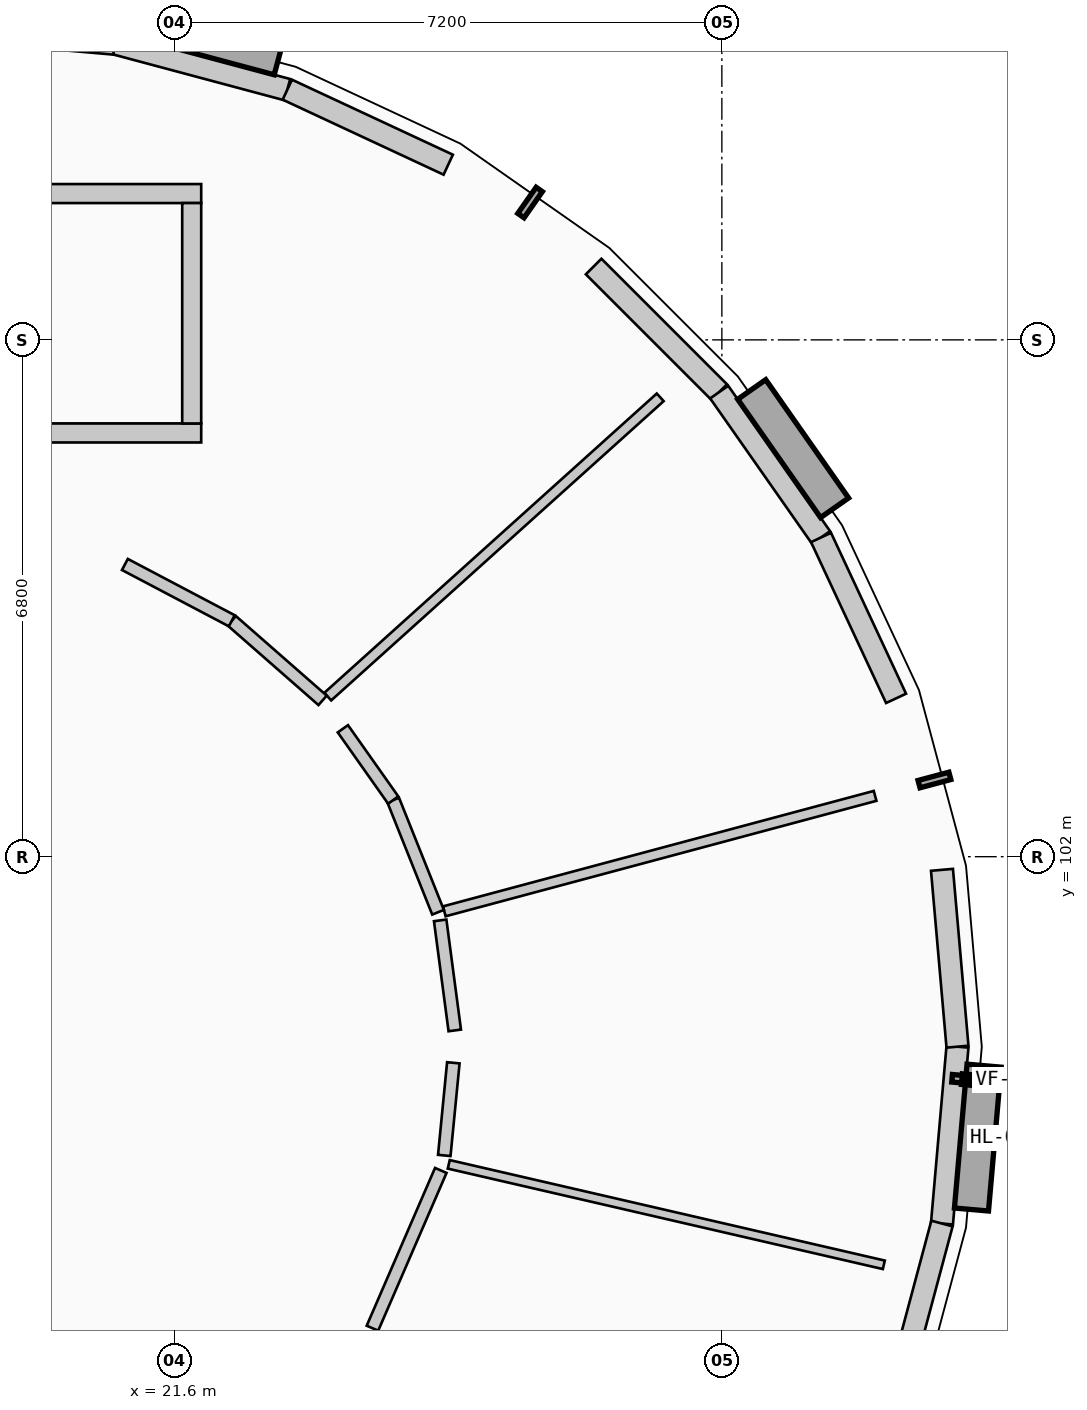
"""IFC4 building model, lengths in metres.
Left out: names, types, materials, properties, quantities, classifications, styles, units other than length and angle.
Written with IfcOpenShell. Run it as: python <this file> out.ifc"""

import sys

from ifc_helpers import new_model, si_unit, direction, frame, frame_2d, origin, origin_2d, place, context, subcontext, project, spatial, rectangle, extrude, element, fill, save


model = new_model("IFC4")
c1 = context("Model", 3, precision=1e-05, world=origin(), true_north=direction((0.0, 1.0)))
c2 = subcontext(c1, "Body", "Model", "MODEL_VIEW")
j1 = project(units=[si_unit("LENGTHUNIT", "METRE"), si_unit("PLANEANGLEUNIT", "RADIAN")], contexts=[c1])
p1 = place(None, origin())
s1 = spatial("IfcSite", under=j1, at=p1, CompositionType="ELEMENT")
p2 = place(p1, origin())
s2 = spatial("IfcBuilding", under=s1, at=p2, CompositionType="ELEMENT")
p3 = place(p2, frame((0.0, 0.0, 4.55)))
s3 = spatial("IfcBuildingStorey", under=s2, at=p3, CompositionType="ELEMENT", Elevation=4.55)
for number, where, z_axis, x_axis in (
    (1, (31.38, 99.5, 0.0), (0.0, 0.0, 1.0), (1.0, 0.0, 0.0)),
    (2, (30.603, 103.905, 0.0), (0.0, 0.0, 1.0), (1.0, 0.0, 0.0)),
    (3, (28.367, 107.779, 0.0), (0.0, 0.0, 1.0), (1.0, 0.0, 0.0)),
    (4, (24.94, 110.654, 0.0), (0.0, 0.0, 1.0), (1.0, 0.0, 0.0)),
    (5, (20.737, 112.184, 0.0), (0.0, 0.0, 1.0), (1.0, 0.0, 0.0)),
    (6, (25.3, 99.5, 0.0), (0.0, 0.0, 1.0), (1.0, 0.0, 0.0)),
    (7, (23.709, 103.871, 0.0), (0.0, 0.0, 1.0), (1.0, 0.0, 0.0)),
):
    element("IfcColumn", number, at=place(p3, frame(where, z_axis=z_axis, x_axis=x_axis)), inside=s3, PredefinedType="COLUMN", context=c2, shape_type="SweptSolid", body=[
        extrude(rectangle(XDim=0.42, YDim=0.42, at=origin_2d()), origin(), (0.0, 0.0, 1.0), 4.2),
    ])
p4 = place(p3, frame((31.9, 99.5, 0.0), z_axis=(0.0, 0.0, 1.0), x_axis=(-0.087274565792, -0.996184295282, 0.0)))
e8 = element("IfcWall", 8, at=p4, inside=s3, PredefinedType="ELEMENTEDWALL", context=c2, shape_type="SweptSolid", body=[
    extrude(rectangle(XDim=2.336, YDim=0.29, at=frame_2d((1.168, 0.0))), origin(), (0.0, 0.0, 1.0), 3.309),
])
p5 = place(p4, frame((0.568, 0.0, 0.85)))
e9 = element("IfcOpeningElement", 9, at=p5, cuts=e8, PredefinedType="OPENING", context=c2, shape_type="SweptSolid", body=[
    extrude(rectangle(XDim=1.2, YDim=1.35, at=frame_2d((0.6, 0.675))), frame((0.0, 0.155, 0.0), z_axis=(0.0, -1.0, 0.0), x_axis=(1.0, 0.0, 0.0)), (0.0, 0.0, 1.0), 0.31),
])
p6 = place(p3, frame((31.696, 97.173, 0.0), z_axis=(0.0, 0.0, 1.0), x_axis=(-0.258612423585, -0.965981166673, 0.0)))
e10 = element("IfcWall", 10, at=p6, inside=s3, PredefinedType="ELEMENTEDWALL", context=c2, shape_type="SweptSolid", body=[
    extrude(rectangle(XDim=2.335, YDim=0.29, at=frame_2d((1.168, 0.0))), origin(), (0.0, 0.0, 1.0), 3.309),
])
p7 = place(p6, frame((0.568, 0.0, 0.85)))
e11 = element("IfcOpeningElement", 11, at=p7, cuts=e10, PredefinedType="OPENING", context=c2, shape_type="SweptSolid", body=[
    extrude(rectangle(XDim=1.2, YDim=1.65, at=frame_2d((0.6, 0.825))), frame((0.0, 0.155, 0.0), z_axis=(0.0, -1.0, 0.0), x_axis=(1.0, 0.0, 0.0)), (0.0, 0.0, 1.0), 0.31),
])
p8 = place(p3, frame((18.5, 112.9, 0.0), z_axis=(0.0, 0.0, 1.0), x_axis=(0.996184295282, -0.087274565792, 0.0)))
e12 = element("IfcWall", 12, at=p8, inside=s3, PredefinedType="ELEMENTEDWALL", context=c2, shape_type="SweptSolid", body=[
    extrude(rectangle(XDim=2.336, YDim=0.29, at=frame_2d((1.168, 0.0))), origin(), (0.0, 0.0, 1.0), 3.309),
])
p9 = place(p3, frame((20.827, 112.696, 0.0), z_axis=(0.0, 0.0, 1.0), x_axis=(0.965981166673, -0.258612423585, 0.0)))
e13 = element("IfcWall", 13, at=p9, inside=s3, PredefinedType="ELEMENTEDWALL", context=c2, shape_type="SweptSolid", body=[
    extrude(rectangle(XDim=2.335, YDim=0.29, at=frame_2d((1.168, 0.0))), origin(), (0.0, 0.0, 1.0), 3.309),
])
p10 = place(p9, frame((0.478, 0.0, 0.85)))
e14 = element("IfcOpeningElement", 14, at=p10, cuts=e13, PredefinedType="OPENING", context=c2, shape_type="SweptSolid", body=[
    extrude(rectangle(XDim=1.38, YDim=1.7, at=frame_2d((0.69, 0.85))), frame((0.0, 0.155, 0.0), z_axis=(0.0, -1.0, 0.0), x_axis=(1.0, 0.0, 0.0)), (0.0, 0.0, 1.0), 0.31),
])
p11 = place(p3, frame((23.083, 112.092, 0.0), z_axis=(0.0, 0.0, 1.0), x_axis=(0.906321946979, -0.422587894318, 0.0)))
e15 = element("IfcWall", 15, at=p11, inside=s3, PredefinedType="ELEMENTEDWALL", context=c2, shape_type="SweptSolid", body=[
    extrude(rectangle(XDim=2.336, YDim=0.29, at=frame_2d((1.168, 0.0))), origin(), (0.0, 0.0, 1.0), 3.309),
])
p12 = place(p11, frame((0.468, 0.0, 0.85)))
e16 = element("IfcOpeningElement", 16, at=p12, cuts=e15, PredefinedType="OPENING", context=c2, shape_type="SweptSolid", body=[
    extrude(rectangle(XDim=1.4, YDim=1.25, at=frame_2d((0.7, 0.625))), frame((0.0, 0.155, 0.0), z_axis=(0.0, -1.0, 0.0), x_axis=(1.0, 0.0, 0.0)), (0.0, 0.0, 1.0), 0.31),
])
p13 = place(p3, frame((27.113, 109.765, 0.0), z_axis=(0.0, 0.0, 1.0), x_axis=(0.707106781187, -0.707106781187, 0.0)))
e17 = element("IfcWall", 17, at=p13, inside=s3, PredefinedType="ELEMENTEDWALL", context=c2, shape_type="SweptSolid", body=[
    extrude(rectangle(XDim=2.336, YDim=0.29, at=frame_2d((1.168, 0.0))), origin(), (0.0, 0.0, 1.0), 3.309),
])
p14 = place(p13, frame((0.468, 0.0, 0.85)))
e18 = element("IfcOpeningElement", 18, at=p14, cuts=e17, PredefinedType="OPENING", context=c2, shape_type="SweptSolid", body=[
    extrude(rectangle(XDim=1.4, YDim=1.6, at=frame_2d((0.7, 0.8))), frame((0.0, 0.155, 0.0), z_axis=(0.0, -1.0, 0.0), x_axis=(1.0, 0.0, 0.0)), (0.0, 0.0, 1.0), 0.31),
])
p15 = place(p3, frame((28.765, 108.113, 0.0), z_axis=(0.0, 0.0, 1.0), x_axis=(0.573728883722, -0.819045278347, 0.0)))
e19 = element("IfcWall", 19, at=p15, inside=s3, PredefinedType="ELEMENTEDWALL", context=c2, shape_type="SweptSolid", body=[
    extrude(rectangle(XDim=2.336, YDim=0.29, at=frame_2d((1.168, 0.0))), origin(), (0.0, 0.0, 1.0), 3.309),
])
p16 = place(p15, frame((0.468, 0.0, 0.85)))
e20 = element("IfcOpeningElement", 20, at=p16, cuts=e19, PredefinedType="OPENING", context=c2, shape_type="SweptSolid", body=[
    extrude(rectangle(XDim=1.4, YDim=1.9, at=frame_2d((0.7, 0.95))), frame((0.0, 0.155, 0.0), z_axis=(0.0, -1.0, 0.0), x_axis=(1.0, 0.0, 0.0)), (0.0, 0.0, 1.0), 0.31),
])
p17 = place(p3, frame((30.105, 106.2, 0.0), z_axis=(0.0, 0.0, 1.0), x_axis=(0.422587894318, -0.906321946979, 0.0)))
e21 = element("IfcWall", 21, at=p17, inside=s3, PredefinedType="ELEMENTEDWALL", context=c2, shape_type="SweptSolid", body=[
    extrude(rectangle(XDim=2.336, YDim=0.29, at=frame_2d((1.168, 0.0))), origin(), (0.0, 0.0, 1.0), 3.309),
])
p18 = place(p17, frame((0.468, 0.0, 0.85)))
e22 = element("IfcOpeningElement", 22, at=p18, cuts=e21, PredefinedType="OPENING", context=c2, shape_type="SweptSolid", body=[
    extrude(rectangle(XDim=1.4, YDim=2.2, at=frame_2d((0.7, 1.1))), frame((0.0, 0.155, 0.0), z_axis=(0.0, -1.0, 0.0), x_axis=(1.0, 0.0, 0.0)), (0.0, 0.0, 1.0), 0.31),
])
p19 = place(p3, frame((31.696, 101.827, 0.0), z_axis=(0.0, 0.0, 1.0), x_axis=(0.087274565792, -0.996184295282, 0.0)))
e23 = element("IfcWall", 23, at=p19, inside=s3, PredefinedType="ELEMENTEDWALL", context=c2, shape_type="SweptSolid", body=[
    extrude(rectangle(XDim=2.336, YDim=0.29, at=frame_2d((1.168, 0.0))), origin(), (0.0, 0.0, 1.0), 3.309),
])
p20 = place(p19, frame((0.443, 0.0, 0.85)))
e24 = element("IfcOpeningElement", 24, at=p20, cuts=e23, PredefinedType="OPENING", context=c2, shape_type="SweptSolid", body=[
    extrude(rectangle(XDim=1.45, YDim=1.45, at=frame_2d((0.725, 0.725))), frame((0.0, 0.155, 0.0), z_axis=(0.0, -1.0, 0.0), x_axis=(1.0, 0.0, 0.0)), (0.0, 0.0, 1.0), 0.31),
])
p21 = place(p3, frame((15.05, 107.575, 0.0), z_axis=(0.0, 0.0, 1.0), x_axis=(1.0, 0.0, 0.0)))
e25 = element("IfcWall", 25, at=p21, inside=s3, PredefinedType="SHEAR", context=c2, shape_type="SweptSolid", body=[
    extrude(rectangle(XDim=6.9, YDim=0.25, at=frame_2d((3.45, 0.0))), origin(), (0.0, 0.0, 1.0), 3.955),
])
p22 = place(p21, frame((0.43, 0.0, 0.0)))
e26 = element("IfcOpeningElement", 26, at=p22, cuts=e25, PredefinedType="OPENING", context=c2, shape_type="SweptSolid", body=[
    extrude(rectangle(XDim=1.1, YDim=2.15, at=frame_2d((0.55, 1.075))), frame((0.0, 0.135, 0.0), z_axis=(0.0, -1.0, 0.0), x_axis=(1.0, 0.0, 0.0)), (0.0, 0.0, 1.0), 0.27),
])
p23 = place(p3, frame((15.05, 110.725, 0.0), z_axis=(0.0, 0.0, 1.0), x_axis=(1.0, 0.0, 0.0)))
e27 = element("IfcWall", 27, at=p23, inside=s3, PredefinedType="SHEAR", context=c2, shape_type="SweptSolid", body=[
    extrude(rectangle(XDim=6.9, YDim=0.25, at=frame_2d((3.45, 0.0))), origin(), (0.0, 0.0, 1.0), 3.955),
])
p24 = place(p3, frame((21.825, 107.7, 0.0), z_axis=(0.0, 0.0, 1.0), x_axis=(0.0, 1.0, 0.0)))
e28 = element("IfcWall", 28, at=p24, inside=s3, PredefinedType="SHEAR", context=c2, shape_type="SweptSolid", body=[
    extrude(rectangle(XDim=2.9, YDim=0.25, at=frame_2d((1.45, 0.0))), origin(), (0.0, 0.0, 1.0), 3.955),
])
p25 = place(p3, frame((25.207, 97.952, 0.0), z_axis=(0.0, 0.0, 1.0), x_axis=(0.97434915279, -0.225041614944, 0.0)))
e29 = element("IfcWall", 29, at=p25, inside=s3, PredefinedType="PARTITIONING", context=c2, shape_type="SweptSolid", body=[
    extrude(rectangle(XDim=5.875, YDim=0.115, at=frame_2d((2.937, 0.0))), origin(), (0.0, 0.0, 1.0), 3.284),
])
p26 = place(p3, frame((25.148, 101.281, 0.0), z_axis=(0.0, 0.0, 1.0), x_axis=(0.96591239112, 0.258869180632, 0.0)))
e30 = element("IfcWall", 30, at=p26, inside=s3, PredefinedType="PLUMBINGWALL", context=c2, shape_type="SweptSolid", body=[
    extrude(rectangle(XDim=5.868, YDim=0.135, at=frame_2d((2.934, 0.0))), origin(), (0.0, 0.0, 1.0), 3.284),
])
p27 = place(p3, frame((23.615, 104.106, 0.0), z_axis=(0.0, 0.0, 1.0), x_axis=(0.74317862928, 0.669093061525, 0.0)))
e31 = element("IfcWall", 31, at=p27, inside=s3, PredefinedType="PLUMBINGWALL", context=c2, shape_type="SweptSolid", body=[
    extrude(rectangle(XDim=5.885, YDim=0.135, at=frame_2d((2.943, 0.0))), origin(), (0.0, 0.0, 1.0), 3.284),
])
p28 = place(p3, frame((24.203, 95.796, 0.0), z_axis=(0.0, 0.0, 1.0), x_axis=(0.397419678039, 0.917636964985, 0.0)))
e32 = element("IfcWall", 32, at=p28, inside=s3, PredefinedType="PARTITIONING", context=c2, shape_type="SweptSolid", body=[
    extrude(rectangle(XDim=2.262, YDim=0.165, at=frame_2d((1.131, 0.0))), origin(), (0.0, 0.0, 1.0), 3.284),
])
p29 = place(p28, frame((0.586, 0.0, 0.0)))
e33 = element("IfcOpeningElement", 33, at=p29, cuts=e32, PredefinedType="OPENING", context=c2, shape_type="SweptSolid", body=[
    extrude(rectangle(XDim=1.09, YDim=2.22, at=frame_2d((0.545, 1.11))), frame((0.0, 0.093, 0.0), z_axis=(0.0, -1.0, 0.0), x_axis=(1.0, 0.0, 0.0)), (0.0, 0.0, 1.0), 0.185),
])
p30 = place(p3, frame((25.148, 98.069, 0.0), z_axis=(0.0, 0.0, 1.0), x_axis=(0.097273334628, 0.995257704502, 0.0)))
e34 = element("IfcWall", 34, at=p30, inside=s3, PredefinedType="PARTITIONING", context=c2, shape_type="SweptSolid", body=[
    extrude(rectangle(XDim=1.225, YDim=0.165, at=frame_2d((0.612, 0.0))), origin(), (0.0, 0.0, 1.0), 3.284),
])
p31 = place(p3, frame((25.286, 99.714, 0.0), z_axis=(0.0, 0.0, 1.0), x_axis=(-0.131375399625, 0.991332691065, 0.0)))
e35 = element("IfcWall", 35, at=p31, inside=s3, PredefinedType="PARTITIONING", context=c2, shape_type="SweptSolid", body=[
    extrude(rectangle(XDim=1.461, YDim=0.165, at=frame_2d((0.73, 0.0))), origin(), (0.0, 0.0, 1.0), 3.284),
])
p32 = place(p31, frame((0.29, 0.0, 0.0)))
e36 = element("IfcOpeningElement", 36, at=p32, cuts=e35, PredefinedType="OPENING", context=c2, shape_type="SweptSolid", body=[
    extrude(rectangle(XDim=0.88, YDim=2.1, at=frame_2d((0.44, 1.05))), frame((0.0, 0.093, 0.0), z_axis=(0.0, -1.0, 0.0), x_axis=(1.0, 0.0, 0.0)), (0.0, 0.0, 1.0), 0.185),
])
p33 = place(p3, frame((25.066, 101.269, 0.0), z_axis=(0.0, 0.0, 1.0), x_axis=(-0.371072882666, 0.928603745281, 0.0)))
e37 = element("IfcWall", 37, at=p33, inside=s3, PredefinedType="PARTITIONING", context=c2, shape_type="SweptSolid", body=[
    extrude(rectangle(XDim=1.59, YDim=0.165, at=frame_2d((0.795, 0.0))), origin(), (0.0, 0.0, 1.0), 3.284),
])
p34 = place(p33, frame((0.325, 0.0, 0.0)))
e38 = element("IfcOpeningElement", 38, at=p34, cuts=e37, PredefinedType="OPENING", context=c2, shape_type="SweptSolid", body=[
    extrude(rectangle(XDim=0.94, YDim=2.1, at=frame_2d((0.47, 1.05))), frame((0.0, 0.093, 0.0), z_axis=(0.0, -1.0, 0.0), x_axis=(1.0, 0.0, 0.0)), (0.0, 0.0, 1.0), 0.185),
])
p35 = place(p3, frame((24.476, 102.745, 0.0), z_axis=(0.0, 0.0, 1.0), x_axis=(-0.576683197599, 0.816967863265, 0.0)))
e39 = element("IfcWall", 39, at=p35, inside=s3, PredefinedType="PARTITIONING", context=c2, shape_type="SweptSolid", body=[
    extrude(rectangle(XDim=1.148, YDim=0.165, at=frame_2d((0.574, 0.0))), origin(), (0.0, 0.0, 1.0), 3.284),
])
p36 = place(p3, frame((23.547, 104.057, 0.0), z_axis=(0.0, 0.0, 1.0), x_axis=(-0.752129161003, 0.659015724523, 0.0)))
e40 = element("IfcWall", 40, at=p36, inside=s3, PredefinedType="PARTITIONING", context=c2, shape_type="SweptSolid", body=[
    extrude(rectangle(XDim=1.589, YDim=0.165, at=frame_2d((0.794, 0.0))), origin(), (0.0, 0.0, 1.0), 3.284),
])
p37 = place(p36, frame((0.305, 0.0, 0.0)))
e41 = element("IfcOpeningElement", 41, at=p37, cuts=e40, PredefinedType="OPENING", context=c2, shape_type="SweptSolid", body=[
    extrude(rectangle(XDim=0.98, YDim=2.1, at=frame_2d((0.49, 1.05))), frame((0.0, 0.093, 0.0), z_axis=(0.0, -1.0, 0.0), x_axis=(1.0, 0.0, 0.0)), (0.0, 0.0, 1.0), 0.185),
])
p38 = place(p3, frame((22.352, 105.104, 0.0), z_axis=(0.0, 0.0, 1.0), x_axis=(-0.884668179212, 0.466221205749, 0.0)))
e42 = element("IfcWall", 42, at=p38, inside=s3, PredefinedType="PARTITIONING", context=c2, shape_type="SweptSolid", body=[
    extrude(rectangle(XDim=1.589, YDim=0.165, at=frame_2d((0.795, 0.0))), origin(), (0.0, 0.0, 1.0), 3.284),
])
p39 = place(p5, origin())
e43 = element("IfcWindow", 43, at=p39, inside=s3, PartitioningType="SINGLE_PANEL", PredefinedType="WINDOW", context=c2, shape_type="SweptSolid", body=[
    extrude(rectangle(XDim=1.2, YDim=1.35, at=frame_2d((0.6, 0.675))), frame((0.0, 0.03, 0.0), z_axis=(0.0, -1.0, 0.0), x_axis=(1.0, 0.0, 0.0)), (0.0, 0.0, 1.0), 0.06),
])
fill(e9, e43)
p40 = place(p7, origin())
e44 = element("IfcWindow", 44, at=p40, inside=s3, PartitioningType="SINGLE_PANEL", PredefinedType="WINDOW", context=c2, shape_type="SweptSolid", body=[
    extrude(rectangle(XDim=1.2, YDim=1.65, at=frame_2d((0.6, 0.825))), frame((0.0, 0.03, 0.0), z_axis=(0.0, -1.0, 0.0), x_axis=(1.0, 0.0, 0.0)), (0.0, 0.0, 1.0), 0.06),
])
fill(e11, e44)
p41 = place(p10, origin())
e45 = element("IfcWindow", 45, at=p41, inside=s3, PartitioningType="SINGLE_PANEL", PredefinedType="WINDOW", context=c2, shape_type="SweptSolid", body=[
    extrude(rectangle(XDim=1.38, YDim=1.7, at=frame_2d((0.69, 0.85))), frame((0.0, 0.03, 0.0), z_axis=(0.0, -1.0, 0.0), x_axis=(1.0, 0.0, 0.0)), (0.0, 0.0, 1.0), 0.06),
])
fill(e14, e45)
p42 = place(p12, origin())
e46 = element("IfcWindow", 46, at=p42, inside=s3, PartitioningType="SINGLE_PANEL", PredefinedType="WINDOW", context=c2, shape_type="SweptSolid", body=[
    extrude(rectangle(XDim=1.4, YDim=1.25, at=frame_2d((0.7, 0.625))), frame((0.0, 0.03, 0.0), z_axis=(0.0, -1.0, 0.0), x_axis=(1.0, 0.0, 0.0)), (0.0, 0.0, 1.0), 0.06),
])
fill(e16, e46)
p43 = place(p14, origin())
e47 = element("IfcWindow", 47, at=p43, inside=s3, PartitioningType="SINGLE_PANEL", PredefinedType="WINDOW", context=c2, shape_type="SweptSolid", body=[
    extrude(rectangle(XDim=1.4, YDim=1.6, at=frame_2d((0.7, 0.8))), frame((0.0, 0.03, 0.0), z_axis=(0.0, -1.0, 0.0), x_axis=(1.0, 0.0, 0.0)), (0.0, 0.0, 1.0), 0.06),
])
fill(e18, e47)
p44 = place(p16, origin())
e48 = element("IfcWindow", 48, at=p44, inside=s3, PartitioningType="SINGLE_PANEL", PredefinedType="WINDOW", context=c2, shape_type="SweptSolid", body=[
    extrude(rectangle(XDim=1.4, YDim=1.9, at=frame_2d((0.7, 0.95))), frame((0.0, 0.03, 0.0), z_axis=(0.0, -1.0, 0.0), x_axis=(1.0, 0.0, 0.0)), (0.0, 0.0, 1.0), 0.06),
])
fill(e20, e48)
p45 = place(p18, origin())
e49 = element("IfcWindow", 49, at=p45, inside=s3, PartitioningType="SINGLE_PANEL", PredefinedType="WINDOW", context=c2, shape_type="SweptSolid", body=[
    extrude(rectangle(XDim=1.4, YDim=2.2, at=frame_2d((0.7, 1.1))), frame((0.0, 0.03, 0.0), z_axis=(0.0, -1.0, 0.0), x_axis=(1.0, 0.0, 0.0)), (0.0, 0.0, 1.0), 0.06),
])
fill(e22, e49)
p46 = place(p20, origin())
e50 = element("IfcWindow", 50, at=p46, inside=s3, PartitioningType="SINGLE_PANEL", PredefinedType="WINDOW", context=c2, shape_type="SweptSolid", body=[
    extrude(rectangle(XDim=1.45, YDim=1.45, at=frame_2d((0.725, 0.725))), frame((0.0, 0.03, 0.0), z_axis=(0.0, -1.0, 0.0), x_axis=(1.0, 0.0, 0.0)), (0.0, 0.0, 1.0), 0.06),
])
fill(e24, e50)
p47 = place(p29, origin())
e51 = element("IfcDoor", 51, at=p47, inside=s3, OperationType="SINGLE_SWING_RIGHT", PredefinedType="DOOR", context=c2, shape_type="SweptSolid", body=[
    extrude(rectangle(XDim=1.09, YDim=2.22, at=frame_2d((0.545, 1.11))), frame((0.0, 0.025, 0.0), z_axis=(0.0, -1.0, 0.0), x_axis=(1.0, 0.0, 0.0)), (0.0, 0.0, 1.0), 0.05),
])
fill(e33, e51)
p48 = place(p32, origin())
e52 = element("IfcDoor", 52, at=p48, inside=s3, OperationType="SINGLE_SWING_LEFT", PredefinedType="DOOR", context=c2, shape_type="SweptSolid", body=[
    extrude(rectangle(XDim=0.88, YDim=2.1, at=frame_2d((0.44, 1.05))), frame((0.0, 0.025, 0.0), z_axis=(0.0, -1.0, 0.0), x_axis=(1.0, 0.0, 0.0)), (0.0, 0.0, 1.0), 0.05),
])
fill(e36, e52)
p49 = place(p34, origin())
e53 = element("IfcDoor", 53, at=p49, inside=s3, OperationType="SINGLE_SWING_RIGHT", PredefinedType="DOOR", context=c2, shape_type="SweptSolid", body=[
    extrude(rectangle(XDim=0.94, YDim=2.1, at=frame_2d((0.47, 1.05))), frame((0.0, 0.025, 0.0), z_axis=(0.0, -1.0, 0.0), x_axis=(1.0, 0.0, 0.0)), (0.0, 0.0, 1.0), 0.05),
])
fill(e38, e53)
p50 = place(p37, origin())
e54 = element("IfcDoor", 54, at=p50, inside=s3, OperationType="SINGLE_SWING_LEFT", PredefinedType="DOOR", context=c2, shape_type="SweptSolid", body=[
    extrude(rectangle(XDim=0.98, YDim=2.1, at=frame_2d((0.49, 1.05))), frame((0.0, 0.025, 0.0), z_axis=(0.0, -1.0, 0.0), x_axis=(1.0, 0.0, 0.0)), (0.0, 0.0, 1.0), 0.05),
])
fill(e41, e54)
save(model, sys.argv[1])
